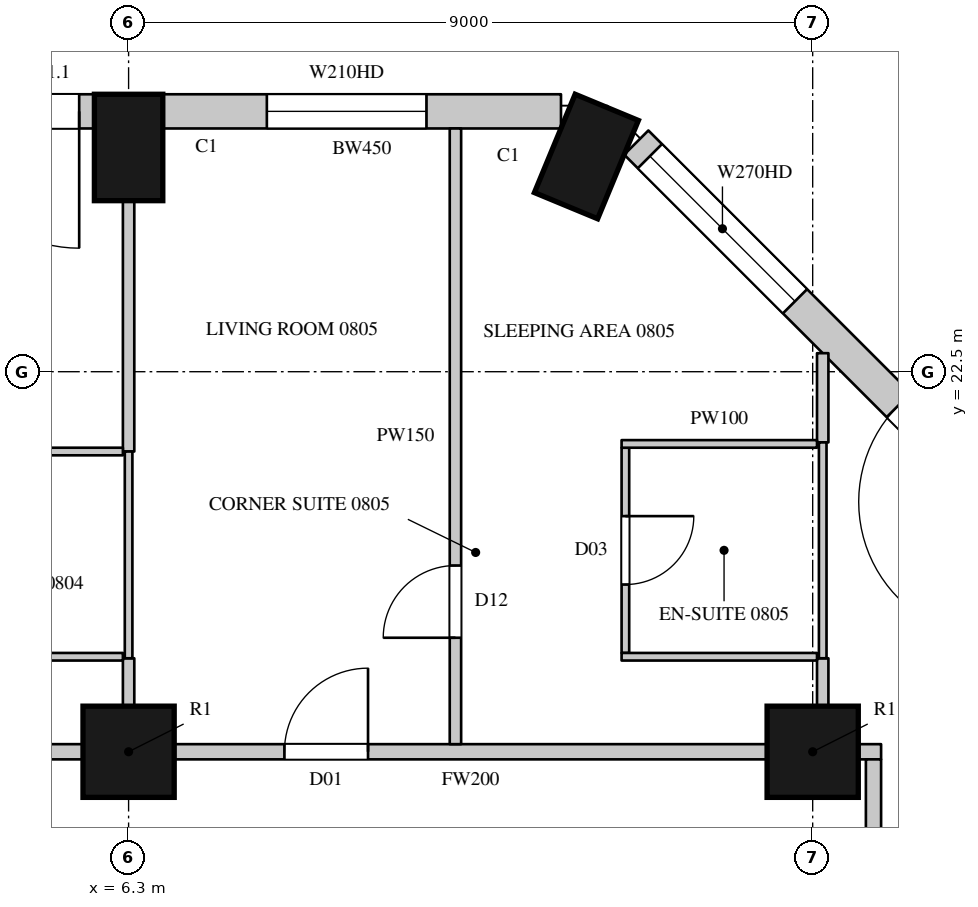
"""IFC4 building model, lengths in metres.
Left out: names, types, materials, properties, quantities, classifications, styles, units other than length and angle.
Written with IfcOpenShell. Run it as: python <this file> out.ifc"""

import sys

from ifc_helpers import new_model, si_unit, direction, frame, frame_2d, origin, origin_2d, place, context, subcontext, project, spatial, rectangle, circle, extrude, element, fill, save


model = new_model("IFC4")
c1 = context("Model", 3, precision=1e-05, world=origin(), true_north=direction((0.0, 1.0)))
c2 = subcontext(c1, "Body", "Model", "MODEL_VIEW")
j1 = project(units=[si_unit("LENGTHUNIT", "METRE"), si_unit("PLANEANGLEUNIT", "RADIAN")], contexts=[c1])
p1 = place(None, origin())
s1 = spatial("IfcSite", under=j1, at=p1, CompositionType="ELEMENT")
p2 = place(p1, origin())
s2 = spatial("IfcBuilding", under=s1, at=p2, CompositionType="ELEMENT")
p3 = place(p2, frame((0.0, 0.0, 59.1)))
s3 = spatial("IfcBuildingStorey", under=s2, at=p3, CompositionType="ELEMENT", Elevation=59.1)
for number, where, z_axis, x_axis in (
    (1, (12.323, 25.331, 0.0), (0.0, 0.0, 1.0), (-0.924, 0.383, 0.0)),
    (2, (6.3, 25.45, 0.0), (0.0, 0.0, 1.0), (-1.0, 0.0, 0.0)),
):
    element("IfcColumn", number, at=place(p3, frame(where, z_axis=z_axis, x_axis=x_axis)), inside=s3, PredefinedType="COLUMN", context=c2, shape_type="SweptSolid", body=[
        extrude(rectangle(XDim=0.9, YDim=1.4, at=origin_2d()), origin(), (0.0, 0.0, 1.0), 3.6),
    ])
for number, where, z_axis, x_axis in (
    (3, (6.3, 17.5, 0.0), (0.0, 0.0, 1.0), (1.0, 0.0, 0.0)),
    (4, (15.3, 17.5, 0.0), (0.0, 0.0, 1.0), (1.0, 0.0, 0.0)),
):
    element("IfcColumn", number, at=place(p3, frame(where, z_axis=z_axis, x_axis=x_axis)), inside=s3, PredefinedType="COLUMN", context=c2, shape_type="SweptSolid", body=[
        extrude(circle(Radius=0.6, at=origin_2d()), origin(), (0.0, 0.0, 1.0), 3.6),
    ])
p4 = place(p3, frame((18.229, 20.265, 0.0), z_axis=(0.0, 0.0, 1.0), x_axis=(-0.707106781187, 0.707106781187, 0.0)))
e5 = element("IfcWall", 5, at=p4, inside=s3, PredefinedType="SOLIDWALL", context=c2, shape_type="SweptSolid", body=[
    extrude(rectangle(XDim=7.424, YDim=0.45, at=frame_2d((3.712, 0.0))), origin(), (0.0, 0.0, 1.0), 3.3),
])
p5 = place(p4, frame((0.74, 0.0, 0.0)))
e6 = element("IfcOpeningElement", 6, at=p5, cuts=e5, PredefinedType="OPENING", context=c2, shape_type="SweptSolid", body=[
    extrude(rectangle(XDim=1.8, YDim=2.4, at=frame_2d((0.9, 1.2))), frame((0.0, 0.235, 0.0), z_axis=(0.0, -1.0, 0.0), x_axis=(1.0, 0.0, 0.0)), (0.0, 0.0, 1.0), 0.47),
])
p6 = place(p4, frame((4.471, 0.0, 1.05)))
e7 = element("IfcOpeningElement", 7, at=p6, cuts=e5, PredefinedType="OPENING", context=c2, shape_type="SweptSolid", body=[
    extrude(rectangle(XDim=2.7, YDim=2.0, at=frame_2d((1.35, 1.0))), frame((0.0, 0.235, 0.0), z_axis=(0.0, -1.0, 0.0), x_axis=(1.0, 0.0, 0.0)), (0.0, 0.0, 1.0), 0.47),
])
p7 = place(p3, frame((11.989, 25.925, 0.0), z_axis=(0.0, 0.0, 1.0), x_axis=(-1.0, 0.0, 0.0)))
e8 = element("IfcWall", 8, at=p7, inside=s3, PredefinedType="SOLIDWALL", context=c2, shape_type="SweptSolid", body=[
    extrude(rectangle(XDim=5.239, YDim=0.45, at=frame_2d((2.619, 0.0))), origin(), (0.0, 0.0, 1.0), 3.3),
])
p8 = place(p7, frame((1.77, 0.0, 1.05)))
e9 = element("IfcOpeningElement", 9, at=p8, cuts=e8, PredefinedType="OPENING", context=c2, shape_type="SweptSolid", body=[
    extrude(rectangle(XDim=2.1, YDim=2.0, at=frame_2d((1.05, 1.0))), frame((0.0, 0.235, 0.0), z_axis=(0.0, -1.0, 0.0), x_axis=(1.0, 0.0, 0.0)), (0.0, 0.0, 1.0), 0.47),
])
p9 = place(p3, frame((5.85, 25.925, 0.0), z_axis=(0.0, 0.0, 1.0), x_axis=(-1.0, 0.0, 0.0)))
e10 = element("IfcWall", 10, at=p9, inside=s3, PredefinedType="SOLIDWALL", context=c2, shape_type="SweptSolid", body=[
    extrude(rectangle(XDim=8.1, YDim=0.45, at=frame_2d((4.05, 0.0))), origin(), (0.0, 0.0, 1.0), 3.3),
])
p10 = place(p9, frame((0.2, 0.0, 0.0)))
e11 = element("IfcOpeningElement", 11, at=p10, cuts=e10, PredefinedType="OPENING", context=c2, shape_type="SweptSolid", body=[
    extrude(rectangle(XDim=1.8, YDim=2.4, at=frame_2d((0.9, 1.2))), frame((0.0, 0.235, 0.0), z_axis=(0.0, -1.0, 0.0), x_axis=(1.0, 0.0, 0.0)), (0.0, 0.0, 1.0), 0.47),
])
p11 = place(p9, frame((2.2, 0.0, 1.05)))
e12 = element("IfcOpeningElement", 12, at=p11, cuts=e10, PredefinedType="OPENING", context=c2, shape_type="SweptSolid", body=[
    extrude(rectangle(XDim=1.2, YDim=2.0, at=frame_2d((0.6, 1.0))), frame((0.0, 0.235, 0.0), z_axis=(0.0, -1.0, 0.0), x_axis=(1.0, 0.0, 0.0)), (0.0, 0.0, 1.0), 0.47),
])
p12 = place(p9, frame((4.7, 0.0, 0.0)))
e13 = element("IfcOpeningElement", 13, at=p12, cuts=e10, PredefinedType="OPENING", context=c2, shape_type="SweptSolid", body=[
    extrude(rectangle(XDim=1.8, YDim=2.4, at=frame_2d((0.9, 1.2))), frame((0.0, 0.235, 0.0), z_axis=(0.0, -1.0, 0.0), x_axis=(1.0, 0.0, 0.0)), (0.0, 0.0, 1.0), 0.47),
])
p13 = place(p9, frame((6.7, 0.0, 1.05)))
e14 = element("IfcOpeningElement", 14, at=p13, cuts=e10, PredefinedType="OPENING", context=c2, shape_type="SweptSolid", body=[
    extrude(rectangle(XDim=1.2, YDim=2.0, at=frame_2d((0.6, 1.0))), frame((0.0, 0.235, 0.0), z_axis=(0.0, -1.0, 0.0), x_axis=(1.0, 0.0, 0.0)), (0.0, 0.0, 1.0), 0.47),
])
p14 = place(p3, frame((16.486, 23.529, 0.0), z_axis=(0.0, 0.0, 1.0), x_axis=(-0.707022305137, 0.707191247145, 0.0)))
e15 = element("IfcWall", 15, at=p14, inside=s3, PredefinedType="SOLIDWALL", context=c2, shape_type="SweptSolid", body=[
    extrude(rectangle(XDim=1.445, YDim=0.45, at=frame_2d((0.723, 0.0))), origin(), (0.0, 0.0, 1.0), 0.6),
])
p15 = place(p3, frame((-2.1, 17.5, 0.0), z_axis=(0.0, 0.0, 1.0), x_axis=(1.0, 0.0, 0.0)))
e16 = element("IfcWall", 16, at=p15, inside=s3, PredefinedType="PARTITIONING", context=c2, shape_type="SweptSolid", body=[
    extrude(rectangle(XDim=7.8, YDim=0.2, at=frame_2d((3.9, 0.0))), origin(), (0.0, 0.0, 1.0), 2.75),
])
p16 = place(p15, frame((4.2, 0.0, 0.0)))
e17 = element("IfcOpeningElement", 17, at=p16, cuts=e16, PredefinedType="OPENING", context=c2, shape_type="SweptSolid", body=[
    extrude(rectangle(XDim=0.95, YDim=2.2, at=frame_2d((0.475, 1.1))), frame((0.0, 0.11, 0.0), z_axis=(0.0, -1.0, 0.0), x_axis=(1.0, 0.0, 0.0)), (0.0, 0.0, 1.0), 0.22),
])
p17 = place(p3, frame((6.9, 17.5, 0.0), z_axis=(0.0, 0.0, 1.0), x_axis=(1.0, 0.0, 0.0)))
e18 = element("IfcWall", 18, at=p17, inside=s3, PredefinedType="PARTITIONING", context=c2, shape_type="SweptSolid", body=[
    extrude(rectangle(XDim=7.8, YDim=0.2, at=frame_2d((3.9, 0.0))), origin(), (0.0, 0.0, 1.0), 2.75),
])
p18 = place(p17, frame((1.45, 0.0, 0.0)))
e19 = element("IfcOpeningElement", 19, at=p18, cuts=e18, PredefinedType="OPENING", context=c2, shape_type="SweptSolid", body=[
    extrude(rectangle(XDim=1.1, YDim=2.4, at=frame_2d((0.55, 1.2))), frame((0.0, 0.11, 0.0), z_axis=(0.0, -1.0, 0.0), x_axis=(1.0, 0.0, 0.0)), (0.0, 0.0, 1.0), 0.22),
])
p19 = place(p3, frame((15.9, 17.5, 0.0), z_axis=(0.0, 0.0, 1.0), x_axis=(1.0, 0.0, 0.0)))
e20 = element("IfcWall", 20, at=p19, inside=s3, PredefinedType="PARTITIONING", context=c2, shape_type="SweptSolid", body=[
    extrude(rectangle(XDim=0.3, YDim=0.2, at=frame_2d((0.15, 0.0))), origin(), (0.0, 0.0, 1.0), 3.3),
])
p20 = place(p3, frame((16.1, 4.75, 0.0), z_axis=(0.0, 0.0, 1.0), x_axis=(0.0, 1.0, 0.0)))
e21 = element("IfcWall", 21, at=p20, inside=s3, PredefinedType="PARTITIONING", context=c2, shape_type="SweptSolid", body=[
    extrude(rectangle(XDim=12.65, YDim=0.2, at=frame_2d((6.325, 0.0))), origin(), (0.0, 0.0, 1.0), 3.3),
])
p21 = place(p20, frame((0.25, 0.0, 0.0)))
e22 = element("IfcOpeningElement", 22, at=p21, cuts=e21, PredefinedType="OPENING", context=c2, shape_type="SweptSolid", body=[
    extrude(rectangle(XDim=0.95, YDim=2.2, at=frame_2d((0.475, 1.1))), frame((0.0, 0.11, 0.0), z_axis=(0.0, -1.0, 0.0), x_axis=(1.0, 0.0, 0.0)), (0.0, 0.0, 1.0), 0.22),
])
p22 = place(p20, frame((6.9, 0.0, 0.0)))
e23 = element("IfcOpeningElement", 23, at=p22, cuts=e21, PredefinedType="OPENING", context=c2, shape_type="SweptSolid", body=[
    extrude(rectangle(XDim=0.95, YDim=2.2, at=frame_2d((0.475, 1.1))), frame((0.0, 0.11, 0.0), z_axis=(0.0, -1.0, 0.0), x_axis=(1.0, 0.0, 0.0)), (0.0, 0.0, 1.0), 0.22),
])
p23 = place(p3, frame((6.3, 18.1, 0.0), z_axis=(0.0, 0.0, 1.0), x_axis=(0.0, 1.0, 0.0)))
e24 = element("IfcWall", 24, at=p23, inside=s3, PredefinedType="PARTITIONING", context=c2, shape_type="SweptSolid", body=[
    extrude(rectangle(XDim=0.63, YDim=0.15, at=frame_2d((0.315, 0.0))), origin(), (0.0, 0.0, 1.0), 2.75),
])
p24 = place(p3, frame((6.3, 21.45, 0.0), z_axis=(0.0, 0.0, 1.0), x_axis=(0.0, 1.0, 0.0)))
e25 = element("IfcWall", 25, at=p24, inside=s3, PredefinedType="PARTITIONING", context=c2, shape_type="SweptSolid", body=[
    extrude(rectangle(XDim=3.3, YDim=0.15, at=frame_2d((1.65, 0.0))), origin(), (0.0, 0.0, 1.0), 2.75),
])
p25 = place(p3, frame((10.6, 17.6, 0.0), z_axis=(0.0, 0.0, 1.0), x_axis=(0.0, 1.0, 0.0)))
e26 = element("IfcWall", 26, at=p25, inside=s3, PredefinedType="PARTITIONING", context=c2, shape_type="SweptSolid", body=[
    extrude(rectangle(XDim=8.1, YDim=0.15, at=frame_2d((4.05, 0.0))), origin(), (0.0, 0.0, 1.0), 3.3),
])
p26 = place(p25, frame((1.4, 0.0, 0.0)))
e27 = element("IfcOpeningElement", 27, at=p26, cuts=e26, PredefinedType="OPENING", context=c2, shape_type="SweptSolid", body=[
    extrude(rectangle(XDim=0.95, YDim=2.2, at=frame_2d((0.475, 1.1))), frame((0.0, 0.085, 0.0), z_axis=(0.0, -1.0, 0.0), x_axis=(1.0, 0.0, 0.0)), (0.0, 0.0, 1.0), 0.17),
])
p27 = place(p3, frame((15.432, 18.094, 0.0), z_axis=(0.0, 0.0, 1.0), x_axis=(0.0, 1.0, 0.0)))
e28 = element("IfcWall", 28, at=p27, inside=s3, PredefinedType="PARTITIONING", context=c2, shape_type="SweptSolid", body=[
    extrude(rectangle(XDim=0.636, YDim=0.15, at=frame_2d((0.318, 0.0))), origin(), (0.0, 0.0, 1.0), 3.3),
])
p28 = place(p3, frame((15.432, 21.57, 0.0), z_axis=(0.0, 0.0, 1.0), x_axis=(0.0, 1.0, 0.0)))
e29 = element("IfcWall", 29, at=p28, inside=s3, PredefinedType="PARTITIONING", context=c2, shape_type="SweptSolid", body=[
    extrude(rectangle(XDim=1.174, YDim=0.15, at=frame_2d((0.587, 0.0))), origin(), (0.0, 0.0, 1.0), 3.3),
])
for number, where, z_axis, x_axis in (
    (30, (3.354, 18.75, 0.0), (0.0, 0.0, 1.0), (1.0, 0.0, 0.0)),
    (31, (3.354, 21.45, 0.0), (0.0, 0.0, 1.0), (1.0, 0.0, 0.0)),
):
    element("IfcWall", number, at=place(p3, frame(where, z_axis=z_axis, x_axis=x_axis)), inside=s3, PredefinedType="PARTITIONING", context=c2, shape_type="SweptSolid", body=[
        extrude(rectangle(XDim=2.871, YDim=0.1, at=frame_2d((1.436, 0.0))), origin(), (0.0, 0.0, 1.0), 3.3),
    ])
p29 = place(p3, frame((6.3, 18.73, 0.0), z_axis=(0.0, 0.0, 1.0), x_axis=(0.0, 1.0, 0.0)))
e32 = element("IfcWall", 32, at=p29, inside=s3, PredefinedType="PARTITIONING", context=c2, shape_type="SweptSolid", body=[
    extrude(rectangle(XDim=2.72, YDim=0.1, at=frame_2d((1.36, 0.0))), origin(), (0.0, 0.0, 1.0), 2.75),
])
p30 = place(p3, frame((12.836, 18.8, 0.0), z_axis=(0.0, 0.0, 1.0), x_axis=(0.0, 1.0, 0.0)))
e33 = element("IfcWall", 33, at=p30, inside=s3, PredefinedType="PARTITIONING", context=c2, shape_type="SweptSolid", body=[
    extrude(rectangle(XDim=2.7, YDim=0.1, at=frame_2d((1.35, 0.0))), origin(), (0.0, 0.0, 1.0), 3.3),
])
p31 = place(p30, frame((0.9, 0.0, 0.0)))
e34 = element("IfcOpeningElement", 34, at=p31, cuts=e33, PredefinedType="OPENING", context=c2, shape_type="SweptSolid", body=[
    extrude(rectangle(XDim=0.9, YDim=2.2, at=frame_2d((0.45, 1.1))), frame((0.0, 0.06, 0.0), z_axis=(0.0, -1.0, 0.0), x_axis=(1.0, 0.0, 0.0)), (0.0, 0.0, 1.0), 0.12),
])
for number, where, z_axis, x_axis in (
    (35, (12.786, 18.75, 0.0), (0.0, 0.0, 1.0), (1.0, 0.0, 0.0)),
    (36, (12.786, 21.55, 0.0), (0.0, 0.0, 1.0), (1.0, 0.0, 0.0)),
):
    element("IfcWall", number, at=place(p3, frame(where, z_axis=z_axis, x_axis=x_axis)), inside=s3, PredefinedType="PARTITIONING", context=c2, shape_type="SweptSolid", body=[
        extrude(rectangle(XDim=2.571, YDim=0.1, at=frame_2d((1.286, 0.0))), origin(), (0.0, 0.0, 1.0), 3.3),
    ])
p32 = place(p3, frame((15.432, 18.73, 0.0), z_axis=(0.0, 0.0, 1.0), x_axis=(0.0, 1.0, 0.0)))
e37 = element("IfcWall", 37, at=p32, inside=s3, PredefinedType="PARTITIONING", context=c2, shape_type="SweptSolid", body=[
    extrude(rectangle(XDim=2.84, YDim=0.1, at=frame_2d((1.42, 0.0))), origin(), (0.0, 0.0, 1.0), 3.3),
])
p33 = place(p5, origin())
e38 = element("IfcDoor", 38, at=p33, inside=s3, OperationType="SLIDING_TO_LEFT", PredefinedType="DOOR", context=c2, shape_type="SweptSolid", body=[
    extrude(rectangle(XDim=1.8, YDim=2.4, at=frame_2d((0.9, 1.2))), frame((0.0, 0.13, 0.0), z_axis=(0.0, -1.0, 0.0), x_axis=(1.0, 0.0, 0.0)), (0.0, 0.0, 1.0), 0.05),
])
fill(e6, e38)
p34 = place(p6, origin())
e39 = element("IfcWindow", 39, at=p34, inside=s3, PartitioningType="SINGLE_PANEL", PredefinedType="WINDOW", context=c2, shape_type="SweptSolid", body=[
    extrude(rectangle(XDim=2.7, YDim=2.0, at=frame_2d((1.35, 1.0))), frame((0.0, 0.135, 0.0), z_axis=(0.0, -1.0, 0.0), x_axis=(1.0, 0.0, 0.0)), (0.0, 0.0, 1.0), 0.06),
])
fill(e7, e39)
p35 = place(p10, origin())
e40 = element("IfcDoor", 40, at=p35, inside=s3, OperationType="SLIDING_TO_LEFT", PredefinedType="DOOR", context=c2, shape_type="SweptSolid", body=[
    extrude(rectangle(XDim=1.8, YDim=2.4, at=frame_2d((0.9, 1.2))), frame((0.0, 0.13, 0.0), z_axis=(0.0, -1.0, 0.0), x_axis=(1.0, 0.0, 0.0)), (0.0, 0.0, 1.0), 0.05),
])
fill(e11, e40)
p36 = place(p18, origin())
e41 = element("IfcDoor", 41, at=p36, inside=s3, OperationType="SINGLE_SWING_RIGHT", PredefinedType="DOOR", context=c2, shape_type="SweptSolid", body=[
    extrude(rectangle(XDim=1.1, YDim=2.4, at=frame_2d((0.55, 1.2))), frame((0.0, 0.025, 0.0), z_axis=(0.0, -1.0, 0.0), x_axis=(1.0, 0.0, 0.0)), (0.0, 0.0, 1.0), 0.05),
])
fill(e19, e41)
p37 = place(p26, origin())
e42 = element("IfcDoor", 42, at=p37, inside=s3, OperationType="SINGLE_SWING_LEFT", PredefinedType="DOOR", context=c2, shape_type="SweptSolid", body=[
    extrude(rectangle(XDim=0.95, YDim=2.2, at=frame_2d((0.475, 1.1))), frame((0.0, 0.025, 0.0), z_axis=(0.0, -1.0, 0.0), x_axis=(1.0, 0.0, 0.0)), (0.0, 0.0, 1.0), 0.05),
])
fill(e27, e42)
p38 = place(p31, origin())
e43 = element("IfcDoor", 43, at=p38, inside=s3, OperationType="SINGLE_SWING_LEFT", PredefinedType="DOOR", context=c2, shape_type="SweptSolid", body=[
    extrude(rectangle(XDim=0.9, YDim=2.2, at=frame_2d((0.45, 1.1))), frame((0.0, 0.025, 0.0), z_axis=(0.0, -1.0, 0.0), x_axis=(1.0, 0.0, 0.0)), (0.0, 0.0, 1.0), 0.05),
])
fill(e34, e43)
p39 = place(p8, origin())
e44 = element("IfcWindow", 44, at=p39, inside=s3, PartitioningType="SINGLE_PANEL", PredefinedType="WINDOW", context=c2, shape_type="SweptSolid", body=[
    extrude(rectangle(XDim=2.1, YDim=2.0, at=frame_2d((1.05, 1.0))), frame((0.0, 0.135, 0.0), z_axis=(0.0, -1.0, 0.0), x_axis=(1.0, 0.0, 0.0)), (0.0, 0.0, 1.0), 0.06),
])
fill(e9, e44)
save(model, sys.argv[1])
